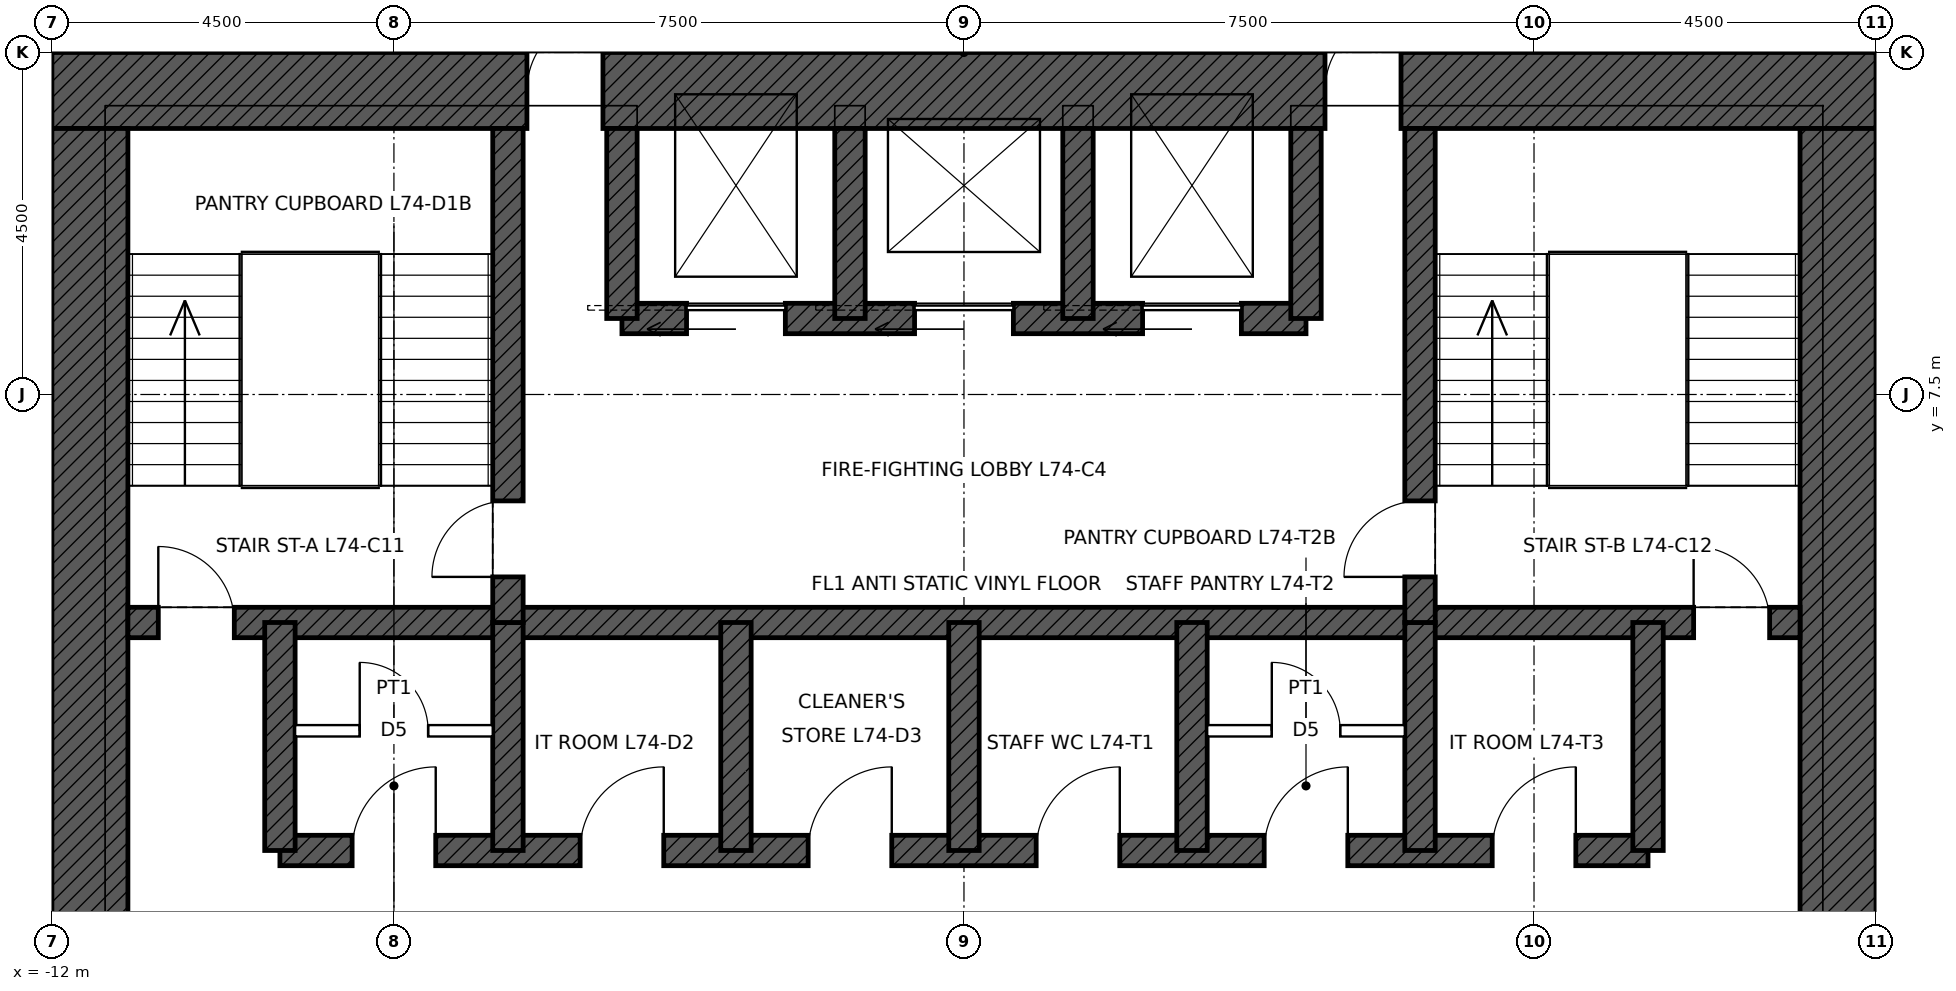
"""IFC4 building model, lengths in metres.
Left out: names, types, materials, properties, quantities, classifications, styles, units other than length and angle.
Written with IfcOpenShell. Run it as: python <this file> out.ifc"""

import sys

from ifc_helpers import new_model, si_unit, direction, frame, frame_2d, origin, place, context, subcontext, project, spatial, rectangle, extrude, element, fill, save


model = new_model("IFC4")
c1 = context("Model", 3, precision=1e-05, world=origin(), true_north=direction((0.0, 1.0)))
c2 = subcontext(c1, "Body", "Model", "MODEL_VIEW")
j1 = project(units=[si_unit("LENGTHUNIT", "METRE"), si_unit("PLANEANGLEUNIT", "RADIAN")], contexts=[c1])
p1 = place(None, origin())
s1 = spatial("IfcSite", under=j1, at=p1, CompositionType="ELEMENT")
p2 = place(p1, origin())
s2 = spatial("IfcBuilding", under=s1, at=p2, CompositionType="ELEMENT")
p3 = place(p2, frame((0.0, 0.0, 331.9)))
s3 = spatial("IfcBuildingStorey", under=s2, at=p3, CompositionType="ELEMENT", Elevation=331.9)
p4 = place(p3, frame((-12.0, 11.5, 0.0), z_axis=(0.0, 0.0, 1.0), x_axis=(1.0, 0.0, 0.0)))
e1 = element("IfcWall", 1, at=p4, inside=s3, PredefinedType="SHEAR", context=c2, shape_type="SweptSolid", body=[
    extrude(rectangle(XDim=24.0, YDim=1.0, at=frame_2d((12.0, 0.0))), origin(), (0.0, 0.0, 1.0), 4.0),
])
p5 = place(p4, frame((6.25, 0.0, 0.0)))
e2 = element("IfcOpeningElement", 2, at=p5, cuts=e1, PredefinedType="OPENING", context=c2, shape_type="SweptSolid", body=[
    extrude(rectangle(XDim=1.0, YDim=2.4, at=frame_2d((0.5, 1.2))), frame((0.0, 0.51, 0.0), z_axis=(0.0, -1.0, 0.0), x_axis=(1.0, 0.0, 0.0)), (0.0, 0.0, 1.0), 1.02),
])
p6 = place(p4, frame((16.75, 0.0, 0.0)))
e3 = element("IfcOpeningElement", 3, at=p6, cuts=e1, PredefinedType="OPENING", context=c2, shape_type="SweptSolid", body=[
    extrude(rectangle(XDim=1.0, YDim=2.4, at=frame_2d((0.5, 1.2))), frame((0.0, 0.51, 0.0), z_axis=(0.0, -1.0, 0.0), x_axis=(1.0, 0.0, 0.0)), (0.0, 0.0, 1.0), 1.02),
])
p7 = place(p3, frame((11.5, 11.0, 0.0), z_axis=(0.0, 0.0, 1.0), x_axis=(0.0, -1.0, 0.0)))
e4 = element("IfcWall", 4, at=p7, inside=s3, PredefinedType="SHEAR", context=c2, shape_type="SweptSolid", body=[
    extrude(rectangle(XDim=22.0, YDim=1.0, at=frame_2d((11.0, 0.0))), origin(), (0.0, 0.0, 1.0), 4.0),
])
p8 = place(p7, frame((10.5, 0.0, 0.0)))
e5 = element("IfcOpeningElement", 5, at=p8, cuts=e4, PredefinedType="OPENING", context=c2, shape_type="SweptSolid", body=[
    extrude(rectangle(XDim=1.0, YDim=2.4, at=frame_2d((0.5, 1.2))), frame((0.0, 0.51, 0.0), z_axis=(0.0, -1.0, 0.0), x_axis=(1.0, 0.0, 0.0)), (0.0, 0.0, 1.0), 1.02),
])
p9 = place(p3, frame((-11.5, -11.0, 0.0), z_axis=(0.0, 0.0, 1.0), x_axis=(0.0, 1.0, 0.0)))
e6 = element("IfcWall", 6, at=p9, inside=s3, PredefinedType="SHEAR", context=c2, shape_type="SweptSolid", body=[
    extrude(rectangle(XDim=22.0, YDim=1.0, at=frame_2d((11.0, 0.0))), origin(), (0.0, 0.0, 1.0), 4.0),
])
p10 = place(p9, frame((10.5, 0.0, 0.0)))
e7 = element("IfcOpeningElement", 7, at=p10, cuts=e6, PredefinedType="OPENING", context=c2, shape_type="SweptSolid", body=[
    extrude(rectangle(XDim=1.0, YDim=2.4, at=frame_2d((0.5, 1.2))), frame((0.0, 0.51, 0.0), z_axis=(0.0, -1.0, 0.0), x_axis=(1.0, 0.0, 0.0)), (0.0, 0.0, 1.0), 1.02),
])
p11 = place(p3, frame((-11.0, 4.5, 0.0), z_axis=(0.0, 0.0, 1.0), x_axis=(1.0, 0.0, 0.0)))
e8 = element("IfcWall", 8, at=p11, inside=s3, PredefinedType="SHEAR", context=c2, shape_type="SweptSolid", body=[
    extrude(rectangle(XDim=22.0, YDim=0.4, at=frame_2d((11.0, 0.0))), origin(), (0.0, 0.0, 1.0), 4.0),
])
p12 = place(p11, frame((0.4, 0.0, 0.0)))
e9 = element("IfcOpeningElement", 9, at=p12, cuts=e8, PredefinedType="OPENING", context=c2, shape_type="SweptSolid", body=[
    extrude(rectangle(XDim=1.0, YDim=2.1, at=frame_2d((0.5, 1.05))), frame((0.0, 0.21, 0.0), z_axis=(0.0, -1.0, 0.0), x_axis=(1.0, 0.0, 0.0)), (0.0, 0.0, 1.0), 0.42),
])
p13 = place(p11, frame((20.6, 0.0, 0.0)))
e10 = element("IfcOpeningElement", 10, at=p13, cuts=e8, PredefinedType="OPENING", context=c2, shape_type="SweptSolid", body=[
    extrude(rectangle(XDim=1.0, YDim=2.1, at=frame_2d((0.5, 1.05))), frame((0.0, 0.21, 0.0), z_axis=(0.0, -1.0, 0.0), x_axis=(1.0, 0.0, 0.0)), (0.0, 0.0, 1.0), 0.42),
])
p14 = place(p3, frame((-9.0, 1.5, 0.0), z_axis=(0.0, 0.0, 1.0), x_axis=(1.0, 0.0, 0.0)))
e11 = element("IfcWall", 11, at=p14, inside=s3, PredefinedType="SHEAR", context=c2, shape_type="SweptSolid", body=[
    extrude(rectangle(XDim=18.0, YDim=0.4, at=frame_2d((9.0, 0.0))), origin(), (0.0, 0.0, 1.0), 4.0),
])
p15 = place(p14, frame((0.95, 0.0, 0.0)))
e12 = element("IfcOpeningElement", 12, at=p15, cuts=e11, PredefinedType="OPENING", context=c2, shape_type="SweptSolid", body=[
    extrude(rectangle(XDim=1.1, YDim=2.1, at=frame_2d((0.55, 1.05))), frame((0.0, 0.21, 0.0), z_axis=(0.0, -1.0, 0.0), x_axis=(1.0, 0.0, 0.0)), (0.0, 0.0, 1.0), 0.42),
])
p16 = place(p14, frame((3.95, 0.0, 0.0)))
e13 = element("IfcOpeningElement", 13, at=p16, cuts=e11, PredefinedType="OPENING", context=c2, shape_type="SweptSolid", body=[
    extrude(rectangle(XDim=1.1, YDim=2.1, at=frame_2d((0.55, 1.05))), frame((0.0, 0.21, 0.0), z_axis=(0.0, -1.0, 0.0), x_axis=(1.0, 0.0, 0.0)), (0.0, 0.0, 1.0), 0.42),
])
p17 = place(p14, frame((6.95, 0.0, 0.0)))
e14 = element("IfcOpeningElement", 14, at=p17, cuts=e11, PredefinedType="OPENING", context=c2, shape_type="SweptSolid", body=[
    extrude(rectangle(XDim=1.1, YDim=2.1, at=frame_2d((0.55, 1.05))), frame((0.0, 0.21, 0.0), z_axis=(0.0, -1.0, 0.0), x_axis=(1.0, 0.0, 0.0)), (0.0, 0.0, 1.0), 0.42),
])
p18 = place(p14, frame((9.95, 0.0, 0.0)))
e15 = element("IfcOpeningElement", 15, at=p18, cuts=e11, PredefinedType="OPENING", context=c2, shape_type="SweptSolid", body=[
    extrude(rectangle(XDim=1.1, YDim=2.1, at=frame_2d((0.55, 1.05))), frame((0.0, 0.21, 0.0), z_axis=(0.0, -1.0, 0.0), x_axis=(1.0, 0.0, 0.0)), (0.0, 0.0, 1.0), 0.42),
])
p19 = place(p14, frame((12.95, 0.0, 0.0)))
e16 = element("IfcOpeningElement", 16, at=p19, cuts=e11, PredefinedType="OPENING", context=c2, shape_type="SweptSolid", body=[
    extrude(rectangle(XDim=1.1, YDim=2.1, at=frame_2d((0.55, 1.05))), frame((0.0, 0.21, 0.0), z_axis=(0.0, -1.0, 0.0), x_axis=(1.0, 0.0, 0.0)), (0.0, 0.0, 1.0), 0.42),
])
p20 = place(p14, frame((15.95, 0.0, 0.0)))
e17 = element("IfcOpeningElement", 17, at=p20, cuts=e11, PredefinedType="OPENING", context=c2, shape_type="SweptSolid", body=[
    extrude(rectangle(XDim=1.1, YDim=2.1, at=frame_2d((0.55, 1.05))), frame((0.0, 0.21, 0.0), z_axis=(0.0, -1.0, 0.0), x_axis=(1.0, 0.0, 0.0)), (0.0, 0.0, 1.0), 0.42),
])
p21 = place(p3, frame((-4.5, 8.5, 0.0), z_axis=(0.0, 0.0, 1.0), x_axis=(1.0, 0.0, 0.0)))
e18 = element("IfcWall", 18, at=p21, inside=s3, PredefinedType="SHEAR", context=c2, shape_type="SweptSolid", body=[
    extrude(rectangle(XDim=9.0, YDim=0.4, at=frame_2d((4.5, 0.0))), origin(), (0.0, 0.0, 1.0), 4.0),
])
p22 = place(p21, frame((0.85, 0.0, 0.0)))
e19 = element("IfcOpeningElement", 19, at=p22, cuts=e18, PredefinedType="OPENING", context=c2, shape_type="SweptSolid", body=[
    extrude(rectangle(XDim=1.3, YDim=2.4, at=frame_2d((0.65, 1.2))), frame((0.0, 0.21, 0.0), z_axis=(0.0, -1.0, 0.0), x_axis=(1.0, 0.0, 0.0)), (0.0, 0.0, 1.0), 0.42),
])
p23 = place(p21, frame((6.85, 0.0, 0.0)))
e20 = element("IfcOpeningElement", 20, at=p23, cuts=e18, PredefinedType="OPENING", context=c2, shape_type="SweptSolid", body=[
    extrude(rectangle(XDim=1.3, YDim=2.4, at=frame_2d((0.65, 1.2))), frame((0.0, 0.21, 0.0), z_axis=(0.0, -1.0, 0.0), x_axis=(1.0, 0.0, 0.0)), (0.0, 0.0, 1.0), 0.42),
])
p24 = place(p21, frame((3.85, 0.0, 0.0)))
e21 = element("IfcOpeningElement", 21, at=p24, cuts=e18, PredefinedType="OPENING", context=c2, shape_type="SweptSolid", body=[
    extrude(rectangle(XDim=1.3, YDim=2.4, at=frame_2d((0.65, 1.2))), frame((0.0, 0.21, 0.0), z_axis=(0.0, -1.0, 0.0), x_axis=(1.0, 0.0, 0.0)), (0.0, 0.0, 1.0), 0.42),
])
for number, where, z_axis, x_axis in (
    (22, (-9.0, 1.5, 0.0), (0.0, 0.0, 1.0), (0.0, 1.0, 0.0)),
    (23, (9.0, 1.5, 0.0), (0.0, 0.0, 1.0), (0.0, 1.0, 0.0)),
    (24, (-6.0, 1.5, 0.0), (0.0, 0.0, 1.0), (0.0, 1.0, 0.0)),
    (25, (-3.0, 1.5, 0.0), (0.0, 0.0, 1.0), (0.0, 1.0, 0.0)),
    (26, (0.0, 1.5, 0.0), (0.0, 0.0, 1.0), (0.0, 1.0, 0.0)),
    (27, (3.0, 1.5, 0.0), (0.0, 0.0, 1.0), (0.0, 1.0, 0.0)),
    (28, (6.0, 1.5, 0.0), (0.0, 0.0, 1.0), (0.0, 1.0, 0.0)),
):
    element("IfcWall", number, at=place(p3, frame(where, z_axis=z_axis, x_axis=x_axis)), inside=s3, PredefinedType="SHEAR", context=c2, shape_type="SweptSolid", body=[
        extrude(rectangle(XDim=3.0, YDim=0.4, at=frame_2d((1.5, 0.0))), origin(), (0.0, 0.0, 1.0), 4.0),
    ])
p25 = place(p3, frame((-6.0, 4.5, 0.0), z_axis=(0.0, 0.0, 1.0), x_axis=(0.0, 1.0, 0.0)))
e29 = element("IfcWall", 29, at=p25, inside=s3, PredefinedType="SHEAR", context=c2, shape_type="SweptSolid", body=[
    extrude(rectangle(XDim=6.5, YDim=0.4, at=frame_2d((3.25, 0.0))), origin(), (0.0, 0.0, 1.0), 4.0),
])
p26 = place(p25, frame((0.6, 0.0, 0.0)))
e30 = element("IfcOpeningElement", 30, at=p26, cuts=e29, PredefinedType="OPENING", context=c2, shape_type="SweptSolid", body=[
    extrude(rectangle(XDim=1.0, YDim=2.1, at=frame_2d((0.5, 1.05))), frame((0.0, 0.21, 0.0), z_axis=(0.0, -1.0, 0.0), x_axis=(1.0, 0.0, 0.0)), (0.0, 0.0, 1.0), 0.42),
])
p27 = place(p3, frame((6.0, 4.5, 0.0), z_axis=(0.0, 0.0, 1.0), x_axis=(0.0, 1.0, 0.0)))
e31 = element("IfcWall", 31, at=p27, inside=s3, PredefinedType="SHEAR", context=c2, shape_type="SweptSolid", body=[
    extrude(rectangle(XDim=6.5, YDim=0.4, at=frame_2d((3.25, 0.0))), origin(), (0.0, 0.0, 1.0), 4.0),
])
p28 = place(p27, frame((0.6, 0.0, 0.0)))
e32 = element("IfcOpeningElement", 32, at=p28, cuts=e31, PredefinedType="OPENING", context=c2, shape_type="SweptSolid", body=[
    extrude(rectangle(XDim=1.0, YDim=2.1, at=frame_2d((0.5, 1.05))), frame((0.0, 0.21, 0.0), z_axis=(0.0, -1.0, 0.0), x_axis=(1.0, 0.0, 0.0)), (0.0, 0.0, 1.0), 0.42),
])
for number, where, z_axis, x_axis in (
    (33, (-4.5, 8.5, 0.0), (0.0, 0.0, 1.0), (0.0, 1.0, 0.0)),
    (34, (4.5, 8.5, 0.0), (0.0, 0.0, 1.0), (0.0, 1.0, 0.0)),
    (35, (-1.5, 8.5, 0.0), (0.0, 0.0, 1.0), (0.0, 1.0, 0.0)),
    (36, (1.5, 8.5, 0.0), (0.0, 0.0, 1.0), (0.0, 1.0, 0.0)),
):
    element("IfcWall", number, at=place(p3, frame(where, z_axis=z_axis, x_axis=x_axis)), inside=s3, PredefinedType="SHEAR", context=c2, shape_type="SweptSolid", body=[
        extrude(rectangle(XDim=2.5, YDim=0.4, at=frame_2d((1.25, 0.0))), origin(), (0.0, 0.0, 1.0), 4.0),
    ])
p29 = place(p3, frame((-13.575, 12.0, 0.0), z_axis=(0.0, 0.0, 1.0), x_axis=(1.0, 0.0, 0.0)))
e37 = element("IfcWall", 37, at=p29, inside=s3, PredefinedType="PARTITIONING", context=c2, shape_type="SweptSolid", body=[
    extrude(rectangle(XDim=1.575, YDim=0.15, at=frame_2d((0.788, 0.0))), origin(), (0.0, 0.0, 1.0), 3.8),
])
p30 = place(p3, frame((-8.8, 3.075, 0.0), z_axis=(0.0, 0.0, 1.0), x_axis=(1.0, 0.0, 0.0)))
e38 = element("IfcWall", 38, at=p30, inside=s3, PredefinedType="PARTITIONING", context=c2, shape_type="SweptSolid", body=[
    extrude(rectangle(XDim=2.6, YDim=0.15, at=frame_2d((1.3, 0.0))), origin(), (0.0, 0.0, 1.0), 3.75),
])
p31 = place(p30, frame((0.85, 0.0, 0.0)))
e39 = element("IfcOpeningElement", 39, at=p31, cuts=e38, PredefinedType="OPENING", context=c2, shape_type="SweptSolid", body=[
    extrude(rectangle(XDim=0.9, YDim=2.1, at=frame_2d((0.45, 1.05))), frame((0.0, 0.085, 0.0), z_axis=(0.0, -1.0, 0.0), x_axis=(1.0, 0.0, 0.0)), (0.0, 0.0, 1.0), 0.17),
])
p32 = place(p3, frame((3.2, 3.075, 0.0), z_axis=(0.0, 0.0, 1.0), x_axis=(1.0, 0.0, 0.0)))
e40 = element("IfcWall", 40, at=p32, inside=s3, PredefinedType="PARTITIONING", context=c2, shape_type="SweptSolid", body=[
    extrude(rectangle(XDim=2.6, YDim=0.15, at=frame_2d((1.3, 0.0))), origin(), (0.0, 0.0, 1.0), 3.75),
])
p33 = place(p32, frame((0.85, 0.0, 0.0)))
e41 = element("IfcOpeningElement", 41, at=p33, cuts=e40, PredefinedType="OPENING", context=c2, shape_type="SweptSolid", body=[
    extrude(rectangle(XDim=0.9, YDim=2.1, at=frame_2d((0.45, 1.05))), frame((0.0, 0.085, 0.0), z_axis=(0.0, -1.0, 0.0), x_axis=(1.0, 0.0, 0.0)), (0.0, 0.0, 1.0), 0.17),
])
p34 = place(p12, origin())
e42 = element("IfcDoor", 42, at=p34, inside=s3, OperationType="SINGLE_SWING_LEFT", PredefinedType="DOOR", context=c2, shape_type="SweptSolid", body=[
    extrude(rectangle(XDim=1.0, YDim=2.1, at=frame_2d((0.5, 1.05))), frame((0.0, 0.025, 0.0), z_axis=(0.0, -1.0, 0.0), x_axis=(1.0, 0.0, 0.0)), (0.0, 0.0, 1.0), 0.05),
])
fill(e9, e42)
p35 = place(p13, origin())
e43 = element("IfcDoor", 43, at=p35, inside=s3, OperationType="SINGLE_SWING_LEFT", PredefinedType="DOOR", context=c2, shape_type="SweptSolid", body=[
    extrude(rectangle(XDim=1.0, YDim=2.1, at=frame_2d((0.5, 1.05))), frame((0.0, 0.025, 0.0), z_axis=(0.0, -1.0, 0.0), x_axis=(1.0, 0.0, 0.0)), (0.0, 0.0, 1.0), 0.05),
])
fill(e10, e43)
p36 = place(p26, origin())
e44 = element("IfcDoor", 44, at=p36, inside=s3, OperationType="SINGLE_SWING_LEFT", PredefinedType="DOOR", context=c2, shape_type="SweptSolid", body=[
    extrude(rectangle(XDim=1.0, YDim=2.1, at=frame_2d((0.5, 1.05))), frame((0.0, 0.025, 0.0), z_axis=(0.0, -1.0, 0.0), x_axis=(1.0, 0.0, 0.0)), (0.0, 0.0, 1.0), 0.05),
])
fill(e30, e44)
p37 = place(p28, origin())
e45 = element("IfcDoor", 45, at=p37, inside=s3, OperationType="SINGLE_SWING_LEFT", PredefinedType="DOOR", context=c2, shape_type="SweptSolid", body=[
    extrude(rectangle(XDim=1.0, YDim=2.1, at=frame_2d((0.5, 1.05))), frame((0.0, 0.025, 0.0), z_axis=(0.0, -1.0, 0.0), x_axis=(1.0, 0.0, 0.0)), (0.0, 0.0, 1.0), 0.05),
])
fill(e32, e45)
p38 = place(p5, origin())
e46 = element("IfcDoor", 46, at=p38, inside=s3, OperationType="SINGLE_SWING_RIGHT", PredefinedType="DOOR", context=c2, shape_type="SweptSolid", body=[
    extrude(rectangle(XDim=1.0, YDim=2.4, at=frame_2d((0.5, 1.2))), frame((0.0, 0.485, 0.0), z_axis=(0.0, -1.0, 0.0), x_axis=(1.0, 0.0, 0.0)), (0.0, 0.0, 1.0), 0.05),
])
fill(e2, e46)
p39 = place(p6, origin())
e47 = element("IfcDoor", 47, at=p39, inside=s3, OperationType="SINGLE_SWING_RIGHT", PredefinedType="DOOR", context=c2, shape_type="SweptSolid", body=[
    extrude(rectangle(XDim=1.0, YDim=2.4, at=frame_2d((0.5, 1.2))), frame((0.0, 0.485, 0.0), z_axis=(0.0, -1.0, 0.0), x_axis=(1.0, 0.0, 0.0)), (0.0, 0.0, 1.0), 0.05),
])
fill(e3, e47)
p40 = place(p22, origin())
e48 = element("IfcDoor", 48, at=p40, inside=s3, OperationType="SLIDING_TO_LEFT", PredefinedType="DOOR", context=c2, shape_type="SweptSolid", body=[
    extrude(rectangle(XDim=1.3, YDim=2.4, at=frame_2d((0.65, 1.2))), frame((0.0, 0.025, 0.0), z_axis=(0.0, -1.0, 0.0), x_axis=(1.0, 0.0, 0.0)), (0.0, 0.0, 1.0), 0.05),
])
fill(e19, e48)
p41 = place(p23, origin())
e49 = element("IfcDoor", 49, at=p41, inside=s3, OperationType="SLIDING_TO_LEFT", PredefinedType="DOOR", context=c2, shape_type="SweptSolid", body=[
    extrude(rectangle(XDim=1.3, YDim=2.4, at=frame_2d((0.65, 1.2))), frame((0.0, 0.025, 0.0), z_axis=(0.0, -1.0, 0.0), x_axis=(1.0, 0.0, 0.0)), (0.0, 0.0, 1.0), 0.05),
])
fill(e20, e49)
p42 = place(p24, origin())
e50 = element("IfcDoor", 50, at=p42, inside=s3, OperationType="SLIDING_TO_LEFT", PredefinedType="DOOR", context=c2, shape_type="SweptSolid", body=[
    extrude(rectangle(XDim=1.3, YDim=2.4, at=frame_2d((0.65, 1.2))), frame((0.0, 0.025, 0.0), z_axis=(0.0, -1.0, 0.0), x_axis=(1.0, 0.0, 0.0)), (0.0, 0.0, 1.0), 0.05),
])
fill(e21, e50)
p43 = place(p15, origin())
e51 = element("IfcDoor", 51, at=p43, inside=s3, OperationType="SINGLE_SWING_RIGHT", PredefinedType="DOOR", context=c2, shape_type="SweptSolid", body=[
    extrude(rectangle(XDim=1.1, YDim=2.1, at=frame_2d((0.55, 1.05))), frame((0.0, 0.025, 0.0), z_axis=(0.0, -1.0, 0.0), x_axis=(1.0, 0.0, 0.0)), (0.0, 0.0, 1.0), 0.05),
])
fill(e12, e51)
p44 = place(p31, origin())
e52 = element("IfcDoor", 52, at=p44, inside=s3, OperationType="SINGLE_SWING_LEFT", PredefinedType="DOOR", context=c2, shape_type="SweptSolid", body=[
    extrude(rectangle(XDim=0.9, YDim=2.1, at=frame_2d((0.45, 1.05))), frame((0.0, 0.025, 0.0), z_axis=(0.0, -1.0, 0.0), x_axis=(1.0, 0.0, 0.0)), (0.0, 0.0, 1.0), 0.05),
])
fill(e39, e52)
p45 = place(p16, origin())
e53 = element("IfcDoor", 53, at=p45, inside=s3, OperationType="SINGLE_SWING_RIGHT", PredefinedType="DOOR", context=c2, shape_type="SweptSolid", body=[
    extrude(rectangle(XDim=1.1, YDim=2.1, at=frame_2d((0.55, 1.05))), frame((0.0, 0.025, 0.0), z_axis=(0.0, -1.0, 0.0), x_axis=(1.0, 0.0, 0.0)), (0.0, 0.0, 1.0), 0.05),
])
fill(e13, e53)
p46 = place(p17, origin())
e54 = element("IfcDoor", 54, at=p46, inside=s3, OperationType="SINGLE_SWING_RIGHT", PredefinedType="DOOR", context=c2, shape_type="SweptSolid", body=[
    extrude(rectangle(XDim=1.1, YDim=2.1, at=frame_2d((0.55, 1.05))), frame((0.0, 0.025, 0.0), z_axis=(0.0, -1.0, 0.0), x_axis=(1.0, 0.0, 0.0)), (0.0, 0.0, 1.0), 0.05),
])
fill(e14, e54)
p47 = place(p18, origin())
e55 = element("IfcDoor", 55, at=p47, inside=s3, OperationType="SINGLE_SWING_RIGHT", PredefinedType="DOOR", context=c2, shape_type="SweptSolid", body=[
    extrude(rectangle(XDim=1.1, YDim=2.1, at=frame_2d((0.55, 1.05))), frame((0.0, 0.025, 0.0), z_axis=(0.0, -1.0, 0.0), x_axis=(1.0, 0.0, 0.0)), (0.0, 0.0, 1.0), 0.05),
])
fill(e15, e55)
p48 = place(p19, origin())
e56 = element("IfcDoor", 56, at=p48, inside=s3, OperationType="SINGLE_SWING_RIGHT", PredefinedType="DOOR", context=c2, shape_type="SweptSolid", body=[
    extrude(rectangle(XDim=1.1, YDim=2.1, at=frame_2d((0.55, 1.05))), frame((0.0, 0.025, 0.0), z_axis=(0.0, -1.0, 0.0), x_axis=(1.0, 0.0, 0.0)), (0.0, 0.0, 1.0), 0.05),
])
fill(e16, e56)
p49 = place(p33, origin())
e57 = element("IfcDoor", 57, at=p49, inside=s3, OperationType="SINGLE_SWING_LEFT", PredefinedType="DOOR", context=c2, shape_type="SweptSolid", body=[
    extrude(rectangle(XDim=0.9, YDim=2.1, at=frame_2d((0.45, 1.05))), frame((0.0, 0.025, 0.0), z_axis=(0.0, -1.0, 0.0), x_axis=(1.0, 0.0, 0.0)), (0.0, 0.0, 1.0), 0.05),
])
fill(e41, e57)
p50 = place(p20, origin())
e58 = element("IfcDoor", 58, at=p50, inside=s3, OperationType="SINGLE_SWING_RIGHT", PredefinedType="DOOR", context=c2, shape_type="SweptSolid", body=[
    extrude(rectangle(XDim=1.1, YDim=2.1, at=frame_2d((0.55, 1.05))), frame((0.0, 0.025, 0.0), z_axis=(0.0, -1.0, 0.0), x_axis=(1.0, 0.0, 0.0)), (0.0, 0.0, 1.0), 0.05),
])
fill(e17, e58)
save(model, sys.argv[1])
